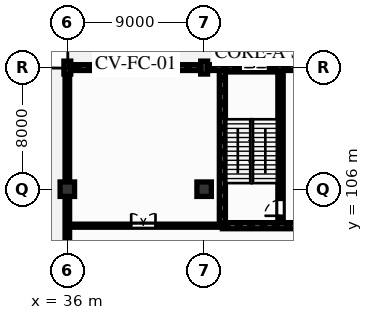
"""IFC4 building model, lengths in metres.
Left out: names, types, materials, properties, quantities, classifications, styles, units other than length and angle.
Written with IfcOpenShell. Run it as: python <this file> out.ifc"""

import sys

from ifc_helpers import new_model, si_unit, direction, frame, frame_2d, origin, origin_2d, place, context, subcontext, project, spatial, rectangle, extrude, element, fill, save


model = new_model("IFC4")
c1 = context("Model", 3, precision=1e-05, world=origin(), true_north=direction((0.0, 1.0)))
c2 = subcontext(c1, "Body", "Model", "MODEL_VIEW")
j1 = project(units=[si_unit("LENGTHUNIT", "METRE"), si_unit("PLANEANGLEUNIT", "RADIAN")], contexts=[c1])
p1 = place(None, origin())
s1 = spatial("IfcSite", under=j1, at=p1, CompositionType="ELEMENT")
p2 = place(p1, origin())
s2 = spatial("IfcBuilding", under=s1, at=p2, CompositionType="ELEMENT")
p3 = place(p2, origin())
s3 = spatial("IfcBuildingStorey", under=s2, at=p3, CompositionType="ELEMENT", Elevation=0.0)
p4 = place(p3, frame((36.0, 106.0, 0.0), z_axis=(0.0, 0.0, 1.0), x_axis=(1.0, 0.0, 0.0)))
e1 = element("IfcColumn", 1, at=p4, inside=s3, PredefinedType="COLUMN", context=c2, shape_type="SweptSolid", body=[
    extrude(rectangle(XDim=0.95, YDim=0.95, at=origin_2d()), origin(), (0.0, 0.0, 1.0), 5.1),
])
p5 = place(p3, frame((36.0, 114.0, 0.0), z_axis=(0.0, 0.0, 1.0), x_axis=(0.0, 1.0, 0.0)))
e2 = element("IfcColumn", 2, at=p5, inside=s3, PredefinedType="COLUMN", context=c2, shape_type="SweptSolid", body=[
    extrude(rectangle(XDim=0.45, YDim=0.85, at=origin_2d()), origin(), (0.0, 0.0, 1.0), 5.1),
])
p6 = place(p3, frame((45.0, 106.0, 0.0), z_axis=(0.0, 0.0, 1.0), x_axis=(1.0, 0.0, 0.0)))
e3 = element("IfcColumn", 3, at=p6, inside=s3, PredefinedType="COLUMN", context=c2, shape_type="SweptSolid", body=[
    extrude(rectangle(XDim=0.95, YDim=0.95, at=origin_2d()), origin(), (0.0, 0.0, 1.0), 5.1),
])
p7 = place(p3, frame((45.0, 114.0, 0.0), z_axis=(0.0, 0.0, 1.0), x_axis=(0.0, 1.0, 0.0)))
e4 = element("IfcColumn", 4, at=p7, inside=s3, PredefinedType="COLUMN", context=c2, shape_type="SweptSolid", body=[
    extrude(rectangle(XDim=0.45, YDim=0.85, at=origin_2d()), origin(), (0.0, 0.0, 1.0), 5.1),
])
p8 = place(p3, frame((36.0, 114.0, 0.0), z_axis=(0.0, 0.0, 1.0), x_axis=(1.0, 0.0, 0.0)))
e5 = element("IfcWall", 5, at=p8, inside=s3, PredefinedType="SOLIDWALL", context=c2, shape_type="SweptSolid", body=[
    extrude(rectangle(XDim=9.0, YDim=0.38, at=frame_2d((4.5, 0.0))), origin(), (0.0, 0.0, 1.0), 4.8),
])
p9 = place(p8, frame((2.2, 0.0, 1.15)))
e6 = element("IfcOpeningElement", 6, at=p9, cuts=e5, PredefinedType="OPENING", context=c2, shape_type="SweptSolid", body=[
    extrude(rectangle(XDim=0.75, YDim=2.2, at=frame_2d((0.375, 1.1))), frame((0.0, 0.2, 0.0), z_axis=(0.0, -1.0, 0.0), x_axis=(1.0, 0.0, 0.0)), (0.0, 0.0, 1.0), 0.4),
])
p10 = place(p8, frame((5.4, 0.0, 1.15)))
e7 = element("IfcOpeningElement", 7, at=p10, cuts=e5, PredefinedType="OPENING", context=c2, shape_type="SweptSolid", body=[
    extrude(rectangle(XDim=0.9, YDim=2.2, at=frame_2d((0.45, 1.1))), frame((0.0, 0.2, 0.0), z_axis=(0.0, -1.0, 0.0), x_axis=(1.0, 0.0, 0.0)), (0.0, 0.0, 1.0), 0.4),
])
p11 = place(p3, frame((45.0, 114.0, 0.0), z_axis=(0.0, 0.0, 1.0), x_axis=(1.0, 0.0, 0.0)))
e8 = element("IfcWall", 8, at=p11, inside=s3, PredefinedType="SOLIDWALL", context=c2, shape_type="SweptSolid", body=[
    extrude(rectangle(XDim=9.0, YDim=0.38, at=frame_2d((4.5, 0.0))), origin(), (0.0, 0.0, 1.0), 4.8),
])
p12 = place(p11, frame((2.4, 0.0, 0.0)))
e9 = element("IfcOpeningElement", 9, at=p12, cuts=e8, PredefinedType="OPENING", context=c2, shape_type="SweptSolid", body=[
    extrude(rectangle(XDim=1.8, YDim=2.4, at=frame_2d((0.9, 1.2))), frame((0.0, 0.2, 0.0), z_axis=(0.0, -1.0, 0.0), x_axis=(1.0, 0.0, 0.0)), (0.0, 0.0, 1.0), 0.4),
])
p13 = place(p3, frame((36.0, 82.2, 0.0), z_axis=(0.0, 0.0, 1.0), x_axis=(0.0, 1.0, 0.0)))
e10 = element("IfcWall", 10, at=p13, inside=s3, PredefinedType="SOLIDWALL", context=c2, shape_type="SweptSolid", body=[
    extrude(rectangle(XDim=31.8, YDim=0.3, at=frame_2d((15.9, 0.0))), origin(), (0.0, 0.0, 1.0), 4.095),
])
p14 = place(p13, frame((3.0, 0.0, 0.95)))
e11 = element("IfcOpeningElement", 11, at=p14, cuts=e10, PredefinedType="OPENING", context=c2, shape_type="SweptSolid", body=[
    extrude(rectangle(XDim=1.35, YDim=1.85, at=frame_2d((0.675, 0.925))), frame((0.0, 0.16, 0.0), z_axis=(0.0, -1.0, 0.0), x_axis=(1.0, 0.0, 0.0)), (0.0, 0.0, 1.0), 0.32),
])
p15 = place(p13, frame((9.5, 0.0, 0.95)))
e12 = element("IfcOpeningElement", 12, at=p15, cuts=e10, PredefinedType="OPENING", context=c2, shape_type="SweptSolid", body=[
    extrude(rectangle(XDim=1.05, YDim=1.75, at=frame_2d((0.525, 0.875))), frame((0.0, 0.16, 0.0), z_axis=(0.0, -1.0, 0.0), x_axis=(1.0, 0.0, 0.0)), (0.0, 0.0, 1.0), 0.32),
])
p16 = place(p13, frame((16.5, 0.0, 0.95)))
e13 = element("IfcOpeningElement", 13, at=p16, cuts=e10, PredefinedType="OPENING", context=c2, shape_type="SweptSolid", body=[
    extrude(rectangle(XDim=1.5, YDim=2.1, at=frame_2d((0.75, 1.05))), frame((0.0, 0.16, 0.0), z_axis=(0.0, -1.0, 0.0), x_axis=(1.0, 0.0, 0.0)), (0.0, 0.0, 1.0), 0.32),
])
p17 = place(p3, frame((46.2, 103.6, 0.0), z_axis=(0.0, 0.0, 1.0), x_axis=(1.0, 0.0, 0.0)))
e14 = element("IfcWall", 14, at=p17, inside=s3, PredefinedType="SHEAR", context=c2, shape_type="SweptSolid", body=[
    extrude(rectangle(XDim=13.2, YDim=0.4, at=frame_2d((6.6, 0.0))), origin(), (0.0, 0.0, 1.0), 4.8),
])
p18 = place(p17, frame((5.8, 0.0, 0.0)))
e15 = element("IfcOpeningElement", 15, at=p18, cuts=e14, PredefinedType="OPENING", context=c2, shape_type="SweptSolid", body=[
    extrude(rectangle(XDim=1.5, YDim=2.2, at=frame_2d((0.75, 1.1))), frame((0.0, 0.21, 0.0), z_axis=(0.0, -1.0, 0.0), x_axis=(1.0, 0.0, 0.0)), (0.0, 0.0, 1.0), 0.42),
])
p19 = place(p3, frame((46.2, 103.8, 0.0), z_axis=(0.0, 0.0, 1.0), x_axis=(0.0, 1.0, 0.0)))
e16 = element("IfcWall", 16, at=p19, inside=s3, PredefinedType="SHEAR", context=c2, shape_type="SweptSolid", body=[
    extrude(rectangle(XDim=10.01, YDim=0.4, at=frame_2d((5.005, 0.0))), origin(), (0.0, 0.0, 1.0), 4.8),
])
p20 = place(p3, frame((50.025, 103.8, 0.0), z_axis=(0.0, 0.0, 1.0), x_axis=(0.0, 1.0, 0.0)))
e17 = element("IfcWall", 17, at=p20, inside=s3, PredefinedType="SHEAR", context=c2, shape_type="SweptSolid", body=[
    extrude(rectangle(XDim=10.01, YDim=0.35, at=frame_2d((5.005, 0.0))), origin(), (0.0, 0.0, 1.0), 4.8),
])
p21 = place(p20, frame((0.45, 0.0, 0.0)))
e18 = element("IfcOpeningElement", 18, at=p21, cuts=e17, PredefinedType="OPENING", context=c2, shape_type="SweptSolid", body=[
    extrude(rectangle(XDim=1.05, YDim=2.2, at=frame_2d((0.525, 1.1))), frame((0.0, 0.185, 0.0), z_axis=(0.0, -1.0, 0.0), x_axis=(1.0, 0.0, 0.0)), (0.0, 0.0, 1.0), 0.37),
])
p22 = place(p3, frame((36.0, 103.6, 0.0), z_axis=(0.0, 0.0, 1.0), x_axis=(1.0, 0.0, 0.0)))
e19 = element("IfcWall", 19, at=p22, inside=s3, PredefinedType="PARTITIONING", context=c2, shape_type="SweptSolid", body=[
    extrude(rectangle(XDim=10.2, YDim=0.2, at=frame_2d((5.1, 0.0))), origin(), (0.0, 0.0, 1.0), 4.8),
])
p23 = place(p22, frame((4.2, 0.0, 0.0)))
e20 = element("IfcOpeningElement", 20, at=p23, cuts=e19, PredefinedType="OPENING", context=c2, shape_type="SweptSolid", body=[
    extrude(rectangle(XDim=1.6, YDim=2.2, at=frame_2d((0.8, 1.1))), frame((0.0, 0.11, 0.0), z_axis=(0.0, -1.0, 0.0), x_axis=(1.0, 0.0, 0.0)), (0.0, 0.0, 1.0), 0.22),
])
p24 = place(p9, origin())
e21 = element("IfcWindow", 21, at=p24, inside=s3, PartitioningType="SINGLE_PANEL", PredefinedType="WINDOW", context=c2, shape_type="SweptSolid", body=[
    extrude(rectangle(XDim=0.75, YDim=2.2, at=frame_2d((0.375, 1.1))), frame((0.0, 0.03, 0.0), z_axis=(0.0, -1.0, 0.0), x_axis=(1.0, 0.0, 0.0)), (0.0, 0.0, 1.0), 0.06),
])
fill(e6, e21)
p25 = place(p10, origin())
e22 = element("IfcWindow", 22, at=p25, inside=s3, PartitioningType="SINGLE_PANEL", PredefinedType="WINDOW", context=c2, shape_type="SweptSolid", body=[
    extrude(rectangle(XDim=0.9, YDim=2.2, at=frame_2d((0.45, 1.1))), frame((0.0, 0.03, 0.0), z_axis=(0.0, -1.0, 0.0), x_axis=(1.0, 0.0, 0.0)), (0.0, 0.0, 1.0), 0.06),
])
fill(e7, e22)
p26 = place(p12, origin())
e23 = element("IfcDoor", 23, at=p26, inside=s3, OperationType="DOUBLE_DOOR_SINGLE_SWING", PredefinedType="DOOR", context=c2, shape_type="SweptSolid", body=[
    extrude(rectangle(XDim=1.8, YDim=2.4, at=frame_2d((0.9, 1.2))), frame((0.0, 0.025, 0.0), z_axis=(0.0, -1.0, 0.0), x_axis=(1.0, 0.0, 0.0)), (0.0, 0.0, 1.0), 0.05),
])
fill(e9, e23)
p27 = place(p21, origin())
e24 = element("IfcDoor", 24, at=p27, inside=s3, OperationType="SINGLE_SWING_LEFT", PredefinedType="DOOR", context=c2, shape_type="SweptSolid", body=[
    extrude(rectangle(XDim=1.05, YDim=2.2, at=frame_2d((0.525, 1.1))), frame((0.0, 0.025, 0.0), z_axis=(0.0, -1.0, 0.0), x_axis=(1.0, 0.0, 0.0)), (0.0, 0.0, 1.0), 0.05),
])
fill(e18, e24)
p28 = place(p23, origin())
e25 = element("IfcDoor", 25, at=p28, inside=s3, OperationType="DOUBLE_DOOR_SINGLE_SWING", PredefinedType="DOOR", context=c2, shape_type="SweptSolid", body=[
    extrude(rectangle(XDim=1.6, YDim=2.2, at=frame_2d((0.8, 1.1))), frame((0.0, 0.025, 0.0), z_axis=(0.0, -1.0, 0.0), x_axis=(1.0, 0.0, 0.0)), (0.0, 0.0, 1.0), 0.05),
])
fill(e20, e25)
save(model, sys.argv[1])
